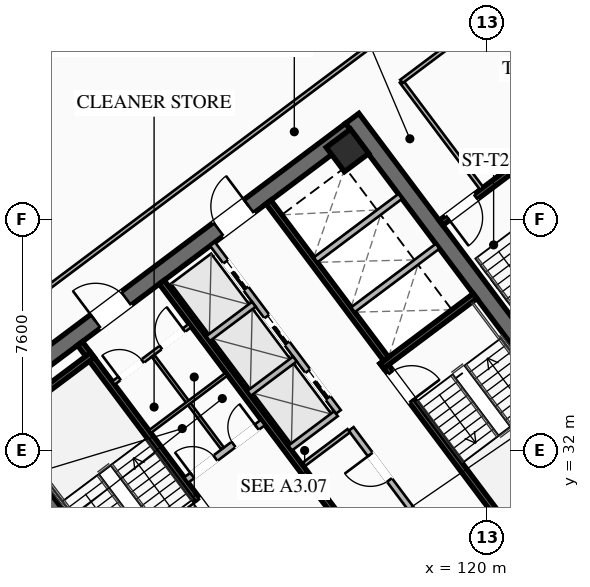
"""IFC4 building model, lengths in metres.
Left out: names, types, materials, properties, quantities, classifications, styles, units other than length and angle.
Written with IfcOpenShell. Run it as: python <this file> out.ifc"""

import sys

from ifc_helpers import new_model, si_unit, direction, frame, frame_2d, origin, origin_2d, place, context, subcontext, project, spatial, rectangle, hollow_rectangle, extrude, element, fill, save


model = new_model("IFC4")
c1 = context("Model", 3, precision=1e-05, world=origin(), true_north=direction((0.0, 1.0)))
c2 = subcontext(c1, "Body", "Model", "MODEL_VIEW")
j1 = project(units=[si_unit("LENGTHUNIT", "METRE"), si_unit("PLANEANGLEUNIT", "RADIAN")], contexts=[c1])
p1 = place(None, origin())
s1 = spatial("IfcSite", under=j1, at=p1, CompositionType="ELEMENT")
p2 = place(p1, origin())
s2 = spatial("IfcBuilding", under=s1, at=p2, CompositionType="ELEMENT")
p3 = place(p2, frame((0.0, 0.0, 117.95)))
s3 = spatial("IfcBuildingStorey", under=s2, at=p3, CompositionType="ELEMENT", Elevation=117.95)
for number, where, z_axis, x_axis in (
    (1, (112.436, 21.077, 0.0), (0.0, 0.0, 1.0), (-0.6, 0.8, 0.0)),
    (2, (115.564, 42.923, 0.0), (0.0, 0.0, 1.0), (0.6, -0.8, 0.0)),
):
    element("IfcWall", number, at=place(p3, frame(where, z_axis=z_axis, x_axis=x_axis)), inside=s3, PredefinedType="SHEAR", context=c2, shape_type="SweptSolid", body=[
        extrude(rectangle(XDim=15.6, YDim=0.55, at=frame_2d((7.8, 0.0))), origin(), (0.0, 0.0, 1.0), 3.55),
    ])
p4 = place(p3, frame((124.539, 30.498, 0.0), z_axis=(0.0, 0.0, 1.0), x_axis=(-0.799998054672, -0.600002593761, 0.0)))
e3 = element("IfcWall", 3, at=p4, inside=s3, PredefinedType="SHEAR", context=c2, shape_type="SweptSolid", body=[
    extrude(rectangle(XDim=15.06, YDim=0.55, at=frame_2d((7.53, 0.0))), origin(), (0.0, 0.0, 1.0), 3.55),
])
p5 = place(p4, frame((9.23, 0.0, 0.0)))
e4 = element("IfcOpeningElement", 4, at=p5, cuts=e3, PredefinedType="OPENING", context=c2, shape_type="SweptSolid", body=[
    extrude(rectangle(XDim=1.25, YDim=2.25, at=frame_2d((0.625, 1.125))), frame((0.0, 0.285, 0.0), z_axis=(0.0, -1.0, 0.0), x_axis=(1.0, 0.0, 0.0)), (0.0, 0.0, 1.0), 0.57),
])
p6 = place(p4, frame((4.18, 0.0, 0.0)))
e5 = element("IfcOpeningElement", 5, at=p6, cuts=e3, PredefinedType="OPENING", context=c2, shape_type="SweptSolid", body=[
    extrude(rectangle(XDim=1.25, YDim=2.25, at=frame_2d((0.625, 1.125))), frame((0.0, 0.285, 0.0), z_axis=(0.0, -1.0, 0.0), x_axis=(1.0, 0.0, 0.0)), (0.0, 0.0, 1.0), 0.57),
])
p7 = place(p3, frame((103.461, 33.502, 0.0), z_axis=(0.0, 0.0, 1.0), x_axis=(0.799998054672, 0.600002593761, 0.0)))
e6 = element("IfcWall", 6, at=p7, inside=s3, PredefinedType="SHEAR", context=c2, shape_type="SweptSolid", body=[
    extrude(rectangle(XDim=15.06, YDim=0.55, at=frame_2d((7.53, 0.0))), origin(), (0.0, 0.0, 1.0), 3.55),
])
p8 = place(p7, frame((4.58, 0.0, 0.0)))
e7 = element("IfcOpeningElement", 7, at=p8, cuts=e6, PredefinedType="OPENING", context=c2, shape_type="SweptSolid", body=[
    extrude(rectangle(XDim=1.25, YDim=2.25, at=frame_2d((0.625, 1.125))), frame((0.0, 0.285, 0.0), z_axis=(0.0, -1.0, 0.0), x_axis=(1.0, 0.0, 0.0)), (0.0, 0.0, 1.0), 0.57),
])
p9 = place(p7, frame((9.63, 0.0, 0.0)))
e8 = element("IfcOpeningElement", 8, at=p9, cuts=e6, PredefinedType="OPENING", context=c2, shape_type="SweptSolid", body=[
    extrude(rectangle(XDim=1.25, YDim=2.25, at=frame_2d((0.625, 1.125))), frame((0.0, 0.285, 0.0), z_axis=(0.0, -1.0, 0.0), x_axis=(1.0, 0.0, 0.0)), (0.0, 0.0, 1.0), 0.57),
])
p10 = place(p3, frame((115.41, 41.87, 0.0), z_axis=(0.0, 0.0, 1.0), x_axis=(0.799999996291, 0.600000004945, 0.0)))
e9 = element("IfcColumn", 9, at=p10, inside=s3, PredefinedType="COLUMN", context=c2, shape_type="SweptSolid", body=[
    extrude(hollow_rectangle(XDim=1.0, YDim=1.0, WallThickness=0.04, at=origin_2d()), origin(), (0.0, 0.0, 1.0), 3.37),
])
p11 = place(p3, frame((111.44, 29.08, 0.0), z_axis=(0.0, 0.0, 1.0), x_axis=(-0.59999029481, 0.8000072788, 0.0)))
e10 = element("IfcWall", 10, at=p11, inside=s3, PredefinedType="SHEAR", context=c2, shape_type="SweptSolid", body=[
    extrude(rectangle(XDim=8.05, YDim=0.2, at=frame_2d((4.025, 0.0))), origin(), (0.0, 0.0, 1.0), 3.37),
])
p12 = place(p11, frame((0.45, 0.0, 0.0)))
e11 = element("IfcOpeningElement", 11, at=p12, cuts=e10, PredefinedType="OPENING", context=c2, shape_type="SweptSolid", body=[
    extrude(rectangle(XDim=1.15, YDim=2.2, at=frame_2d((0.575, 1.1))), frame((0.0, 0.11, 0.0), z_axis=(0.0, -1.0, 0.0), x_axis=(1.0, 0.0, 0.0)), (0.0, 0.0, 1.0), 0.22),
])
p13 = place(p3, frame((103.956, 32.842, 0.0), z_axis=(0.0, 0.0, 1.0), x_axis=(0.800015298837, 0.599979601008, 0.0)))
e12 = element("IfcWall", 12, at=p13, inside=s3, PredefinedType="SHEAR", context=c2, shape_type="SweptSolid", body=[
    extrude(rectangle(XDim=3.83, YDim=0.2, at=frame_2d((1.915, 0.0))), origin(), (0.0, 0.0, 1.0), 3.37),
])
p14 = place(p3, frame((116.56, 34.92, 0.0), z_axis=(0.0, 0.0, 1.0), x_axis=(0.59999029481, -0.8000072788, 0.0)))
e13 = element("IfcWall", 13, at=p14, inside=s3, PredefinedType="SHEAR", context=c2, shape_type="SweptSolid", body=[
    extrude(rectangle(XDim=8.05, YDim=0.2, at=frame_2d((4.025, 0.0))), origin(), (0.0, 0.0, 1.0), 3.37),
])
p15 = place(p14, frame((0.45, 0.0, 0.0)))
e14 = element("IfcOpeningElement", 14, at=p15, cuts=e13, PredefinedType="OPENING", context=c2, shape_type="SweptSolid", body=[
    extrude(rectangle(XDim=1.15, YDim=2.2, at=frame_2d((0.575, 1.1))), frame((0.0, 0.11, 0.0), z_axis=(0.0, -1.0, 0.0), x_axis=(1.0, 0.0, 0.0)), (0.0, 0.0, 1.0), 0.22),
])
p16 = place(p3, frame((116.54, 34.78, 0.0), z_axis=(0.0, 0.0, 1.0), x_axis=(0.800015298837, 0.599979601008, 0.0)))
e15 = element("IfcWall", 15, at=p16, inside=s3, PredefinedType="SHEAR", context=c2, shape_type="SweptSolid", body=[
    extrude(rectangle(XDim=3.83, YDim=0.2, at=frame_2d((1.915, 0.0))), origin(), (0.0, 0.0, 1.0), 3.37),
])
p17 = place(p3, frame((117.998, 25.936, 0.0), z_axis=(0.0, 0.0, 1.0), x_axis=(-0.600002693989, 0.799997979501, 0.0)))
e16 = element("IfcWall", 16, at=p17, inside=s3, PredefinedType="SHEAR", context=c2, shape_type="SweptSolid", body=[
    extrude(rectangle(XDim=14.5, YDim=0.2, at=frame_2d((7.25, 0.0))), origin(), (0.0, 0.0, 1.0), 3.37),
])
p18 = place(p3, frame((110.104, 31.028, 0.0), z_axis=(0.0, 0.0, 1.0), x_axis=(0.800018601094, 0.59997519774, 0.0)))
e17 = element("IfcWall", 17, at=p18, inside=s3, PredefinedType="SOLIDWALL", context=c2, shape_type="SweptSolid", body=[
    extrude(rectangle(XDim=3.15, YDim=0.22, at=frame_2d((1.575, 0.0))), origin(), (0.0, 0.0, 1.0), 2.723),
])
p19 = place(p18, frame((0.25, 0.0, 0.0)))
e18 = element("IfcOpeningElement", 18, at=p19, cuts=e17, PredefinedType="OPENING", context=c2, shape_type="SweptSolid", body=[
    extrude(rectangle(XDim=0.95, YDim=2.05, at=frame_2d((0.475, 1.025))), frame((0.0, 0.12, 0.0), z_axis=(0.0, -1.0, 0.0), x_axis=(1.0, 0.0, 0.0)), (0.0, 0.0, 1.0), 0.24),
])
p20 = place(p18, frame((1.95, 0.0, 0.0)))
e19 = element("IfcOpeningElement", 19, at=p20, cuts=e17, PredefinedType="OPENING", context=c2, shape_type="SweptSolid", body=[
    extrude(rectangle(XDim=0.95, YDim=2.05, at=frame_2d((0.475, 1.025))), frame((0.0, 0.12, 0.0), z_axis=(0.0, -1.0, 0.0), x_axis=(1.0, 0.0, 0.0)), (0.0, 0.0, 1.0), 0.24),
])
p21 = place(p3, frame((112.81, 40.17, 0.0), z_axis=(0.0, 0.0, 1.0), x_axis=(0.599993943644, -0.800004542231, 0.0)))
e20 = element("IfcWall", 20, at=p21, inside=s3, PredefinedType="SHEAR", context=c2, shape_type="SweptSolid", body=[
    extrude(rectangle(XDim=6.45, YDim=0.2, at=frame_2d((3.225, 0.0))), origin(), (0.0, 0.0, 1.0), 3.37),
])
for number, where, z_axis, x_axis in (
    (21, (115.59, 36.63, 0.0), (0.0, 0.0, 1.0), (0.8, 0.6, 0.0)),
    (22, (114.36, 38.27, 0.0), (0.0, 0.0, 1.0), (0.8, 0.6, 0.0)),
):
    element("IfcWall", number, at=place(p3, frame(where, z_axis=z_axis, x_axis=x_axis)), inside=s3, PredefinedType="SOLIDWALL", context=c2, shape_type="SweptSolid", body=[
        extrude(rectangle(XDim=3.48, YDim=0.2, at=frame_2d((1.74, 0.0))), origin(), (0.0, 0.0, 1.0), 3.37),
    ])
p22 = place(p3, frame((107.71, 34.22, 0.0), z_axis=(0.0, 0.0, 1.0), x_axis=(0.799981399002, 0.60002480053, 0.0)))
e23 = element("IfcWall", 23, at=p22, inside=s3, PredefinedType="PARTITIONING", context=c2, shape_type="SweptSolid", body=[
    extrude(rectangle(XDim=3.15, YDim=0.135, at=frame_2d((1.575, 0.0))), origin(), (0.0, 0.0, 1.0), 2.723),
])
p23 = place(p22, frame((0.25, 0.0, 0.0)))
e24 = element("IfcOpeningElement", 24, at=p23, cuts=e23, PredefinedType="OPENING", context=c2, shape_type="SweptSolid", body=[
    extrude(rectangle(XDim=0.95, YDim=2.05, at=frame_2d((0.475, 1.025))), frame((0.0, 0.077, 0.0), z_axis=(0.0, -1.0, 0.0), x_axis=(1.0, 0.0, 0.0)), (0.0, 0.0, 1.0), 0.155),
])
p24 = place(p22, frame((1.95, 0.0, 0.0)))
e25 = element("IfcOpeningElement", 25, at=p24, cuts=e23, PredefinedType="OPENING", context=c2, shape_type="SweptSolid", body=[
    extrude(rectangle(XDim=0.95, YDim=2.05, at=frame_2d((0.475, 1.025))), frame((0.0, 0.077, 0.0), z_axis=(0.0, -1.0, 0.0), x_axis=(1.0, 0.0, 0.0)), (0.0, 0.0, 1.0), 0.155),
])
p25 = place(p3, frame((111.296, 32.072, 0.0), z_axis=(0.0, 0.0, 1.0), x_axis=(-0.59995887973, 0.800030838552, 0.0)))
e26 = element("IfcWall", 26, at=p25, inside=s3, PredefinedType="PARTITIONING", context=c2, shape_type="SweptSolid", body=[
    extrude(rectangle(XDim=3.8, YDim=0.11, at=frame_2d((1.9, 0.0))), origin(), (0.0, 0.0, 1.0), 2.723),
])
p26 = place(p3, frame((108.91, 32.62, 0.0), z_axis=(0.0, 0.0, 1.0), x_axis=(0.800018601094, 0.59997519774, 0.0)))
e27 = element("IfcWall", 27, at=p26, inside=s3, PredefinedType="PARTITIONING", context=c2, shape_type="SweptSolid", body=[
    extrude(rectangle(XDim=3.15, YDim=0.11, at=frame_2d((1.575, 0.0))), origin(), (0.0, 0.0, 1.0), 2.723),
])
p27 = place(p3, frame((119.67, 27.19, 0.0), z_axis=(0.0, 0.0, 1.0), x_axis=(-0.599988677396, 0.800008491828, 0.0)))
e28 = element("IfcWall", 28, at=p27, inside=s3, PredefinedType="SOLIDWALL", context=c2, shape_type="SweptSolid", body=[
    extrude(rectangle(XDim=6.9, YDim=0.2, at=frame_2d((3.45, 0.0))), origin(), (0.0, 0.0, 1.0), 2.723),
])
p28 = place(p27, frame((0.85, 0.0, 0.0)))
e29 = element("IfcOpeningElement", 29, at=p28, cuts=e28, PredefinedType="OPENING", context=c2, shape_type="SweptSolid", body=[
    extrude(rectangle(XDim=0.95, YDim=2.05, at=frame_2d((0.475, 1.025))), frame((0.0, 0.11, 0.0), z_axis=(0.0, -1.0, 0.0), x_axis=(1.0, 0.0, 0.0)), (0.0, 0.0, 1.0), 0.22),
])
p29 = place(p27, frame((4.8, 0.0, 0.0)))
e30 = element("IfcOpeningElement", 30, at=p29, cuts=e28, PredefinedType="OPENING", context=c2, shape_type="SweptSolid", body=[
    extrude(rectangle(XDim=1.05, YDim=2.2, at=frame_2d((0.525, 1.1))), frame((0.0, 0.11, 0.0), z_axis=(0.0, -1.0, 0.0), x_axis=(1.0, 0.0, 0.0)), (0.0, 0.0, 1.0), 0.22),
])
p30 = place(p3, frame((113.946, 31.522, 0.0), z_axis=(0.0, 0.0, 1.0), x_axis=(0.8, 0.6, 0.0)))
e31 = element("IfcWall", 31, at=p30, inside=s3, PredefinedType="PARTITIONING", context=c2, shape_type="SweptSolid", body=[
    extrude(rectangle(XDim=1.88, YDim=0.135, at=frame_2d((0.94, 0.0))), origin(), (0.0, 0.0, 1.0), 2.723),
])
p31 = place(p3, frame((115.11, 33.27, 0.0), z_axis=(0.0, 0.0, 1.0), x_axis=(-0.600011322243, 0.799991508192, 0.0)))
e32 = element("IfcWall", 32, at=p31, inside=s3, PredefinedType="SOLIDWALL", context=c2, shape_type="SweptSolid", body=[
    extrude(rectangle(XDim=6.9, YDim=0.2, at=frame_2d((3.45, 0.0))), origin(), (0.0, 0.0, 1.0), 3.37),
])
p32 = place(p31, frame((0.575, 0.0, 0.0)))
e33 = element("IfcOpeningElement", 33, at=p32, cuts=e32, PredefinedType="OPENING", context=c2, shape_type="SweptSolid", body=[
    extrude(rectangle(XDim=1.1, YDim=2.2, at=frame_2d((0.55, 1.1))), frame((0.0, 0.11, 0.0), z_axis=(0.0, -1.0, 0.0), x_axis=(1.0, 0.0, 0.0)), (0.0, 0.0, 1.0), 0.22),
])
p33 = place(p31, frame((2.825, 0.0, 0.0)))
e34 = element("IfcOpeningElement", 34, at=p33, cuts=e32, PredefinedType="OPENING", context=c2, shape_type="SweptSolid", body=[
    extrude(rectangle(XDim=1.1, YDim=2.2, at=frame_2d((0.55, 1.1))), frame((0.0, 0.11, 0.0), z_axis=(0.0, -1.0, 0.0), x_axis=(1.0, 0.0, 0.0)), (0.0, 0.0, 1.0), 0.22),
])
p34 = place(p31, frame((5.075, 0.0, 0.0)))
e35 = element("IfcOpeningElement", 35, at=p34, cuts=e32, PredefinedType="OPENING", context=c2, shape_type="SweptSolid", body=[
    extrude(rectangle(XDim=1.1, YDim=2.2, at=frame_2d((0.55, 1.1))), frame((0.0, 0.11, 0.0), z_axis=(0.0, -1.0, 0.0), x_axis=(1.0, 0.0, 0.0)), (0.0, 0.0, 1.0), 0.22),
])
p35 = place(p3, frame((113.526, 32.082, 0.0), z_axis=(0.0, 0.0, 1.0), x_axis=(0.800046745961, 0.599937666993, 0.0)))
e36 = element("IfcWall", 36, at=p35, inside=s3, PredefinedType="SOLIDWALL", context=c2, shape_type="SweptSolid", body=[
    extrude(rectangle(XDim=1.88, YDim=0.2, at=frame_2d((0.94, 0.0))), origin(), (0.0, 0.0, 1.0), 3.37),
])
p36 = place(p3, frame((112.176, 33.882, 0.0), z_axis=(0.0, 0.0, 1.0), x_axis=(0.8, 0.6, 0.0)))
e37 = element("IfcWall", 37, at=p36, inside=s3, PredefinedType="SOLIDWALL", context=c2, shape_type="SweptSolid", body=[
    extrude(rectangle(XDim=1.88, YDim=0.2, at=frame_2d((0.94, 0.0))), origin(), (0.0, 0.0, 1.0), 3.37),
])
p37 = place(p3, frame((110.826, 35.682, 0.0), z_axis=(0.0, 0.0, 1.0), x_axis=(0.799984418148, 0.600020775241, 0.0)))
e38 = element("IfcWall", 38, at=p37, inside=s3, PredefinedType="SOLIDWALL", context=c2, shape_type="SweptSolid", body=[
    extrude(rectangle(XDim=1.88, YDim=0.2, at=frame_2d((0.94, 0.0))), origin(), (0.0, 0.0, 1.0), 3.37),
])
p38 = place(p3, frame((121.204, 41.528, 0.0), z_axis=(0.0, 0.0, 1.0), x_axis=(-0.800017232136, -0.599977023131, 0.0)))
e39 = element("IfcWall", 39, at=p38, inside=s3, PredefinedType="SHEAR", context=c2, shape_type="SweptSolid", body=[
    extrude(rectangle(XDim=3.4, YDim=0.2, at=frame_2d((1.7, 0.0))), origin(), (0.0, 0.0, 1.0), 3.37),
])
p39 = place(p38, frame((1.975, 0.0, 0.0)))
e40 = element("IfcOpeningElement", 40, at=p39, cuts=e39, PredefinedType="OPENING", context=c2, shape_type="SweptSolid", body=[
    extrude(rectangle(XDim=1.15, YDim=2.2, at=frame_2d((0.575, 1.1))), frame((0.0, 0.11, 0.0), z_axis=(0.0, -1.0, 0.0), x_axis=(1.0, 0.0, 0.0)), (0.0, 0.0, 1.0), 0.22),
])
p40 = place(p3, frame((119.824, 40.618, 0.0), z_axis=(0.0, 0.0, 1.0), x_axis=(-0.599982243973, 0.800013316712, 0.0)))
e41 = element("IfcWall", 41, at=p40, inside=s3, PredefinedType="PARTITIONING", context=c2, shape_type="SweptSolid", body=[
    extrude(rectangle(XDim=4.4, YDim=0.135, at=frame_2d((2.2, 0.0))), origin(), (0.0, 0.0, 1.0), 2.723),
])
p41 = place(p3, frame((95.87, 30.09, 0.0), z_axis=(0.0, 0.0, 1.0), x_axis=(0.799997191971, 0.600003744021, 0.0)))
e42 = element("IfcWall", 42, at=p41, inside=s3, PredefinedType="PARTITIONING", context=c2, shape_type="SweptSolid", body=[
    extrude(rectangle(XDim=31.3, YDim=0.135, at=frame_2d((15.65, 0.0))), origin(), (0.0, 0.0, 1.0), 2.723),
])
p42 = place(p41, frame((0.3, 0.0, 0.0)))
e43 = element("IfcOpeningElement", 43, at=p42, cuts=e42, PredefinedType="OPENING", context=c2, shape_type="SweptSolid", body=[
    extrude(rectangle(XDim=0.95, YDim=2.05, at=frame_2d((0.475, 1.025))), frame((0.0, 0.077, 0.0), z_axis=(0.0, -1.0, 0.0), x_axis=(1.0, 0.0, 0.0)), (0.0, 0.0, 1.0), 0.155),
])
p43 = place(p41, frame((30.05, 0.0, 0.0)))
e44 = element("IfcOpeningElement", 44, at=p43, cuts=e42, PredefinedType="OPENING", context=c2, shape_type="SweptSolid", body=[
    extrude(rectangle(XDim=0.95, YDim=2.05, at=frame_2d((0.475, 1.025))), frame((0.0, 0.077, 0.0), z_axis=(0.0, -1.0, 0.0), x_axis=(1.0, 0.0, 0.0)), (0.0, 0.0, 1.0), 0.155),
])
p44 = place(p3, frame((133.282, 32.374, 0.0), z_axis=(0.0, 0.0, 1.0), x_axis=(-0.8, -0.6, 0.0)))
e45 = element("IfcWall", 45, at=p44, inside=s3, PredefinedType="PARTITIONING", context=c2, shape_type="SweptSolid", body=[
    extrude(rectangle(XDim=31.3, YDim=0.135, at=frame_2d((15.65, 0.0))), origin(), (0.0, 0.0, 1.0), 2.723),
])
p45 = place(p44, frame((29.97, 0.0, 0.0)))
e46 = element("IfcOpeningElement", 46, at=p45, cuts=e45, PredefinedType="OPENING", context=c2, shape_type="SweptSolid", body=[
    extrude(rectangle(XDim=0.95, YDim=2.05, at=frame_2d((0.475, 1.025))), frame((0.0, 0.077, 0.0), z_axis=(0.0, -1.0, 0.0), x_axis=(1.0, 0.0, 0.0)), (0.0, 0.0, 1.0), 0.155),
])
p46 = place(p44, frame((19.151, 0.0, 0.0)))
e47 = element("IfcOpeningElement", 47, at=p46, cuts=e45, PredefinedType="OPENING", context=c2, shape_type="SweptSolid", body=[
    extrude(rectangle(XDim=0.95, YDim=2.05, at=frame_2d((0.475, 1.025))), frame((0.0, 0.077, 0.0), z_axis=(0.0, -1.0, 0.0), x_axis=(1.0, 0.0, 0.0)), (0.0, 0.0, 1.0), 0.155),
])
p47 = place(p44, frame((14.901, 0.0, 0.0)))
e48 = element("IfcOpeningElement", 48, at=p47, cuts=e45, PredefinedType="OPENING", context=c2, shape_type="SweptSolid", body=[
    extrude(rectangle(XDim=0.95, YDim=2.05, at=frame_2d((0.475, 1.025))), frame((0.0, 0.077, 0.0), z_axis=(0.0, -1.0, 0.0), x_axis=(1.0, 0.0, 0.0)), (0.0, 0.0, 1.0), 0.155),
])
p48 = place(p44, frame((10.92, 0.0, 0.0)))
e49 = element("IfcOpeningElement", 49, at=p48, cuts=e45, PredefinedType="OPENING", context=c2, shape_type="SweptSolid", body=[
    extrude(rectangle(XDim=0.95, YDim=2.05, at=frame_2d((0.475, 1.025))), frame((0.0, 0.077, 0.0), z_axis=(0.0, -1.0, 0.0), x_axis=(1.0, 0.0, 0.0)), (0.0, 0.0, 1.0), 0.155),
])
p49 = place(p44, frame((0.38, 0.0, 0.0)))
e50 = element("IfcOpeningElement", 50, at=p49, cuts=e45, PredefinedType="OPENING", context=c2, shape_type="SweptSolid", body=[
    extrude(rectangle(XDim=0.95, YDim=2.05, at=frame_2d((0.475, 1.025))), frame((0.0, 0.077, 0.0), z_axis=(0.0, -1.0, 0.0), x_axis=(1.0, 0.0, 0.0)), (0.0, 0.0, 1.0), 0.155),
])
p50 = place(p3, frame((123.944, 49.208, 0.0), z_axis=(0.0, 0.0, 1.0), x_axis=(-0.799996532921, -0.600004622744, 0.0)))
e51 = element("IfcWall", 51, at=p50, inside=s3, PredefinedType="PARTITIONING", context=c2, shape_type="SweptSolid", body=[
    extrude(rectangle(XDim=8.45, YDim=0.135, at=frame_2d((4.225, 0.0))), origin(), (0.0, 0.0, 1.0), 2.723),
])
p51 = place(p50, frame((4.1, 0.0, 0.0)))
e52 = element("IfcOpeningElement", 52, at=p51, cuts=e51, PredefinedType="OPENING", context=c2, shape_type="SweptSolid", body=[
    extrude(rectangle(XDim=0.95, YDim=2.05, at=frame_2d((0.475, 1.025))), frame((0.0, 0.077, 0.0), z_axis=(0.0, -1.0, 0.0), x_axis=(1.0, 0.0, 0.0)), (0.0, 0.0, 1.0), 0.155),
])
p52 = place(p3, frame((112.104, 20.928, 0.0), z_axis=(0.0, 0.0, 1.0), x_axis=(-0.599994940075, 0.800003794918, 0.0)))
e53 = element("IfcWall", 53, at=p52, inside=s3, PredefinedType="PARTITIONING", context=c2, shape_type="SweptSolid", body=[
    extrude(rectangle(XDim=15.44, YDim=0.135, at=frame_2d((7.72, 0.0))), origin(), (0.0, 0.0, 1.0), 2.723),
])
p53 = place(p8, origin())
e54 = element("IfcDoor", 54, at=p53, inside=s3, OperationType="SINGLE_SWING_LEFT", PredefinedType="DOOR", context=c2, shape_type="SweptSolid", body=[
    extrude(rectangle(XDim=1.25, YDim=2.25, at=frame_2d((0.625, 1.125))), frame((0.0, 0.025, 0.0), z_axis=(0.0, -1.0, 0.0), x_axis=(1.0, 0.0, 0.0)), (0.0, 0.0, 1.0), 0.05),
])
fill(e7, e54)
p54 = place(p9, origin())
e55 = element("IfcDoor", 55, at=p54, inside=s3, OperationType="SINGLE_SWING_RIGHT", PredefinedType="DOOR", context=c2, shape_type="SweptSolid", body=[
    extrude(rectangle(XDim=1.25, YDim=2.25, at=frame_2d((0.625, 1.125))), frame((0.0, 0.025, 0.0), z_axis=(0.0, -1.0, 0.0), x_axis=(1.0, 0.0, 0.0)), (0.0, 0.0, 1.0), 0.05),
])
fill(e8, e55)
p55 = place(p12, origin())
e56 = element("IfcDoor", 56, at=p55, inside=s3, OperationType="SINGLE_SWING_RIGHT", PredefinedType="DOOR", context=c2, shape_type="SweptSolid", body=[
    extrude(rectangle(XDim=1.15, YDim=2.2, at=frame_2d((0.575, 1.1))), frame((0.0, 0.025, 0.0), z_axis=(0.0, -1.0, 0.0), x_axis=(1.0, 0.0, 0.0)), (0.0, 0.0, 1.0), 0.05),
])
fill(e11, e56)
p56 = place(p15, origin())
e57 = element("IfcDoor", 57, at=p56, inside=s3, OperationType="SINGLE_SWING_RIGHT", PredefinedType="DOOR", context=c2, shape_type="SweptSolid", body=[
    extrude(rectangle(XDim=1.15, YDim=2.2, at=frame_2d((0.575, 1.1))), frame((0.0, 0.025, 0.0), z_axis=(0.0, -1.0, 0.0), x_axis=(1.0, 0.0, 0.0)), (0.0, 0.0, 1.0), 0.05),
])
fill(e14, e57)
p57 = place(p23, origin())
e58 = element("IfcDoor", 58, at=p57, inside=s3, OperationType="SINGLE_SWING_LEFT", PredefinedType="DOOR", context=c2, shape_type="SweptSolid", body=[
    extrude(rectangle(XDim=0.95, YDim=2.05, at=frame_2d((0.475, 1.025))), frame((0.0, 0.025, 0.0), z_axis=(0.0, -1.0, 0.0), x_axis=(1.0, 0.0, 0.0)), (0.0, 0.0, 1.0), 0.05),
])
fill(e24, e58)
p58 = place(p24, origin())
e59 = element("IfcDoor", 59, at=p58, inside=s3, OperationType="SINGLE_SWING_RIGHT", PredefinedType="DOOR", context=c2, shape_type="SweptSolid", body=[
    extrude(rectangle(XDim=0.95, YDim=2.05, at=frame_2d((0.475, 1.025))), frame((0.0, 0.025, 0.0), z_axis=(0.0, -1.0, 0.0), x_axis=(1.0, 0.0, 0.0)), (0.0, 0.0, 1.0), 0.05),
])
fill(e25, e59)
p59 = place(p19, origin())
e60 = element("IfcDoor", 60, at=p59, inside=s3, OperationType="SINGLE_SWING_LEFT", PredefinedType="DOOR", context=c2, shape_type="SweptSolid", body=[
    extrude(rectangle(XDim=0.95, YDim=2.05, at=frame_2d((0.475, 1.025))), frame((0.0, 0.025, 0.0), z_axis=(0.0, -1.0, 0.0), x_axis=(1.0, 0.0, 0.0)), (0.0, 0.0, 1.0), 0.05),
])
fill(e18, e60)
p60 = place(p20, origin())
e61 = element("IfcDoor", 61, at=p60, inside=s3, OperationType="SINGLE_SWING_RIGHT", PredefinedType="DOOR", context=c2, shape_type="SweptSolid", body=[
    extrude(rectangle(XDim=0.95, YDim=2.05, at=frame_2d((0.475, 1.025))), frame((0.0, 0.025, 0.0), z_axis=(0.0, -1.0, 0.0), x_axis=(1.0, 0.0, 0.0)), (0.0, 0.0, 1.0), 0.05),
])
fill(e19, e61)
p61 = place(p29, origin())
e62 = element("IfcDoor", 62, at=p61, inside=s3, OperationType="SINGLE_SWING_RIGHT", PredefinedType="DOOR", context=c2, shape_type="SweptSolid", body=[
    extrude(rectangle(XDim=1.05, YDim=2.2, at=frame_2d((0.525, 1.1))), frame((0.0, 0.025, 0.0), z_axis=(0.0, -1.0, 0.0), x_axis=(1.0, 0.0, 0.0)), (0.0, 0.0, 1.0), 0.05),
])
fill(e30, e62)
p62 = place(p39, origin())
e63 = element("IfcDoor", 63, at=p62, inside=s3, OperationType="SINGLE_SWING_RIGHT", PredefinedType="DOOR", context=c2, shape_type="SweptSolid", body=[
    extrude(rectangle(XDim=1.15, YDim=2.2, at=frame_2d((0.575, 1.1))), frame((0.0, 0.025, 0.0), z_axis=(0.0, -1.0, 0.0), x_axis=(1.0, 0.0, 0.0)), (0.0, 0.0, 1.0), 0.05),
])
fill(e40, e63)
p63 = place(p32, origin())
e64 = element("IfcDoor", 64, at=p63, inside=s3, OperationType="SLIDING_TO_LEFT", PredefinedType="DOOR", context=c2, shape_type="SweptSolid", body=[
    extrude(rectangle(XDim=1.1, YDim=2.2, at=frame_2d((0.55, 1.1))), frame((0.0, 0.025, 0.0), z_axis=(0.0, -1.0, 0.0), x_axis=(1.0, 0.0, 0.0)), (0.0, 0.0, 1.0), 0.05),
])
fill(e33, e64)
p64 = place(p33, origin())
e65 = element("IfcDoor", 65, at=p64, inside=s3, OperationType="SLIDING_TO_LEFT", PredefinedType="DOOR", context=c2, shape_type="SweptSolid", body=[
    extrude(rectangle(XDim=1.1, YDim=2.2, at=frame_2d((0.55, 1.1))), frame((0.0, 0.025, 0.0), z_axis=(0.0, -1.0, 0.0), x_axis=(1.0, 0.0, 0.0)), (0.0, 0.0, 1.0), 0.05),
])
fill(e34, e65)
p65 = place(p34, origin())
e66 = element("IfcDoor", 66, at=p65, inside=s3, OperationType="SLIDING_TO_LEFT", PredefinedType="DOOR", context=c2, shape_type="SweptSolid", body=[
    extrude(rectangle(XDim=1.1, YDim=2.2, at=frame_2d((0.55, 1.1))), frame((0.0, 0.025, 0.0), z_axis=(0.0, -1.0, 0.0), x_axis=(1.0, 0.0, 0.0)), (0.0, 0.0, 1.0), 0.05),
])
fill(e35, e66)
save(model, sys.argv[1])
